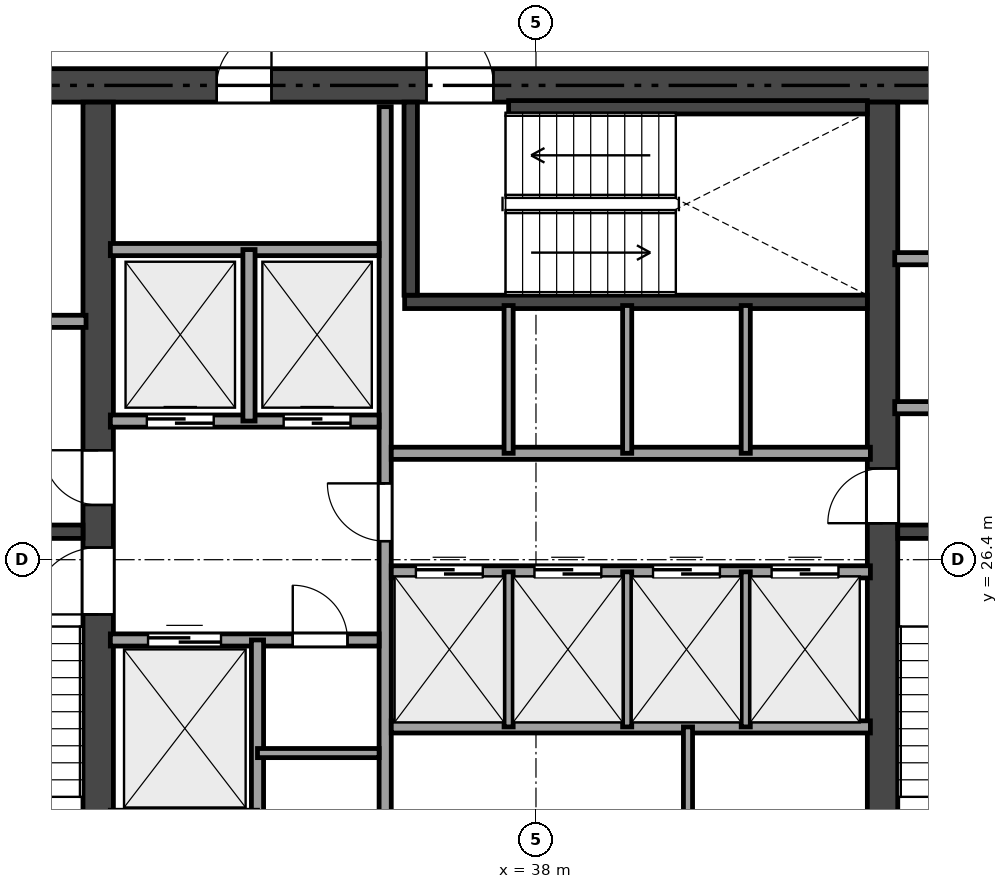
"""IFC4 building model, lengths in metres.
Left out: names, types, materials, properties, quantities, classifications, styles, units other than length and angle.
Written with IfcOpenShell. Run it as: python <this file> out.ifc"""

import sys

from ifc_helpers import new_model, si_unit, direction, frame, frame_2d, origin, place, context, subcontext, project, spatial, rectangle, extrude, element, fill, save


model = new_model("IFC4")
c1 = context("Model", 3, precision=1e-05, world=origin(), true_north=direction((0.0, 1.0)))
c2 = subcontext(c1, "Body", "Model", "MODEL_VIEW")
j1 = project(units=[si_unit("LENGTHUNIT", "METRE"), si_unit("PLANEANGLEUNIT", "RADIAN")], contexts=[c1])
p1 = place(None, origin())
s1 = spatial("IfcSite", under=j1, at=p1, CompositionType="ELEMENT")
p2 = place(p1, origin())
s2 = spatial("IfcBuilding", under=s1, at=p2, CompositionType="ELEMENT")
p3 = place(p2, frame((0.0, 0.0, 220.2)))
s3 = spatial("IfcBuildingStorey", under=s2, at=p3, CompositionType="ELEMENT", Elevation=220.2)
p4 = place(p3, frame((26.525, 34.2, 0.0), z_axis=(0.0, 0.0, 1.0), x_axis=(1.0, 0.0, 0.0)))
e1 = element("IfcWall", 1, at=p4, inside=s3, PredefinedType="SHEAR", context=c2, shape_type="SweptSolid", body=[
    extrude(rectangle(XDim=21.35, YDim=0.55, at=frame_2d((10.675, 0.0))), origin(), (0.0, 0.0, 1.0), 3.24),
])
p5 = place(p4, frame((9.675, 0.0, 0.0)))
e2 = element("IfcOpeningElement", 2, at=p5, cuts=e1, PredefinedType="OPENING", context=c2, shape_type="SweptSolid", body=[
    extrude(rectangle(XDim=1.1, YDim=2.15, at=frame_2d((0.55, 1.075))), frame((0.0, 0.285, 0.0), z_axis=(0.0, -1.0, 0.0), x_axis=(1.0, 0.0, 0.0)), (0.0, 0.0, 1.0), 0.57),
])
p6 = place(p4, frame((1.925, 0.0, 0.0)))
e3 = element("IfcOpeningElement", 3, at=p6, cuts=e1, PredefinedType="OPENING", context=c2, shape_type="SweptSolid", body=[
    extrude(rectangle(XDim=0.9, YDim=2.1, at=frame_2d((0.45, 1.05))), frame((0.0, 0.285, 0.0), z_axis=(0.0, -1.0, 0.0), x_axis=(1.0, 0.0, 0.0)), (0.0, 0.0, 1.0), 0.57),
])
p7 = place(p4, frame((6.225, 0.0, 0.0)))
e4 = element("IfcOpeningElement", 4, at=p7, cuts=e1, PredefinedType="OPENING", context=c2, shape_type="SweptSolid", body=[
    extrude(rectangle(XDim=0.9, YDim=2.1, at=frame_2d((0.45, 1.05))), frame((0.0, 0.285, 0.0), z_axis=(0.0, -1.0, 0.0), x_axis=(1.0, 0.0, 0.0)), (0.0, 0.0, 1.0), 0.57),
])
p8 = place(p3, frame((30.8, 18.875, 0.0), z_axis=(0.0, 0.0, 1.0), x_axis=(0.0, 1.0, 0.0)))
e5 = element("IfcWall", 5, at=p8, inside=s3, PredefinedType="SHEAR", context=c2, shape_type="SweptSolid", body=[
    extrude(rectangle(XDim=15.05, YDim=0.5, at=frame_2d((7.525, 0.0))), origin(), (0.0, 0.0, 1.0), 3.24),
])
p9 = place(p8, frame((6.625, 0.0, 0.0)))
e6 = element("IfcOpeningElement", 6, at=p9, cuts=e5, PredefinedType="OPENING", context=c2, shape_type="SweptSolid", body=[
    extrude(rectangle(XDim=1.1, YDim=2.15, at=frame_2d((0.55, 1.075))), frame((0.0, 0.26, 0.0), z_axis=(0.0, -1.0, 0.0), x_axis=(1.0, 0.0, 0.0)), (0.0, 0.0, 1.0), 0.52),
])
p10 = place(p8, frame((8.425, 0.0, 0.0)))
e7 = element("IfcOpeningElement", 7, at=p10, cuts=e5, PredefinedType="OPENING", context=c2, shape_type="SweptSolid", body=[
    extrude(rectangle(XDim=0.9, YDim=2.1, at=frame_2d((0.45, 1.05))), frame((0.0, 0.26, 0.0), z_axis=(0.0, -1.0, 0.0), x_axis=(1.0, 0.0, 0.0)), (0.0, 0.0, 1.0), 0.52),
])
p11 = place(p3, frame((43.7, 18.875, 0.0), z_axis=(0.0, 0.0, 1.0), x_axis=(0.0, 1.0, 0.0)))
e8 = element("IfcWall", 8, at=p11, inside=s3, PredefinedType="SHEAR", context=c2, shape_type="SweptSolid", body=[
    extrude(rectangle(XDim=15.05, YDim=0.5, at=frame_2d((7.525, 0.0))), origin(), (0.0, 0.0, 1.0), 3.24),
])
p12 = place(p11, frame((8.125, 0.0, 0.0)))
e9 = element("IfcOpeningElement", 9, at=p12, cuts=e8, PredefinedType="OPENING", context=c2, shape_type="SweptSolid", body=[
    extrude(rectangle(XDim=0.9, YDim=2.1, at=frame_2d((0.45, 1.05))), frame((0.0, 0.26, 0.0), z_axis=(0.0, -1.0, 0.0), x_axis=(1.0, 0.0, 0.0)), (0.0, 0.0, 1.0), 0.52),
])
p13 = place(p3, frame((27.075, 26.86, 0.0), z_axis=(0.0, 0.0, 1.0), x_axis=(1.0, 0.0, 0.0)))
e10 = element("IfcWall", 10, at=p13, inside=s3, PredefinedType="SHEAR", context=c2, shape_type="SweptSolid", body=[
    extrude(rectangle(XDim=3.475, YDim=0.22, at=frame_2d((1.738, 0.0))), origin(), (0.0, 0.0, 1.0), 3.24),
])
p14 = place(p3, frame((43.95, 26.86, 0.0), z_axis=(0.0, 0.0, 1.0), x_axis=(1.0, 0.0, 0.0)))
e11 = element("IfcWall", 11, at=p14, inside=s3, PredefinedType="SHEAR", context=c2, shape_type="SweptSolid", body=[
    extrude(rectangle(XDim=3.375, YDim=0.22, at=frame_2d((1.688, 0.0))), origin(), (0.0, 0.0, 1.0), 3.24),
])
p15 = place(p3, frame((35.84, 30.64, 0.0), z_axis=(0.0, 0.0, 1.0), x_axis=(1.0, 0.0, 0.0)))
e12 = element("IfcWall", 12, at=p15, inside=s3, PredefinedType="SHEAR", context=c2, shape_type="SweptSolid", body=[
    extrude(rectangle(XDim=7.61, YDim=0.22, at=frame_2d((3.805, 0.0))), origin(), (0.0, 0.0, 1.0), 3.24),
])
p16 = place(p3, frame((35.94, 30.75, 0.0), z_axis=(0.0, 0.0, 1.0), x_axis=(0.0, 1.0, 0.0)))
e13 = element("IfcWall", 13, at=p16, inside=s3, PredefinedType="SHEAR", context=c2, shape_type="SweptSolid", body=[
    extrude(rectangle(XDim=3.175, YDim=0.22, at=frame_2d((1.587, 0.0))), origin(), (0.0, 0.0, 1.0), 3.24),
])
p17 = place(p3, frame((37.55, 33.84, 0.0), z_axis=(0.0, 0.0, 1.0), x_axis=(1.0, 0.0, 0.0)))
e14 = element("IfcWall", 14, at=p17, inside=s3, PredefinedType="SHEAR", context=c2, shape_type="SweptSolid", body=[
    extrude(rectangle(XDim=5.9, YDim=0.22, at=frame_2d((2.95, 0.0))), origin(), (0.0, 0.0, 1.0), 3.24),
])
p18 = place(p3, frame((27.15, 30.32, 0.0), z_axis=(0.0, 0.0, 1.0), x_axis=(1.0, 0.0, 0.0)))
e15 = element("IfcWall", 15, at=p18, inside=s3, PredefinedType="SOLIDWALL", context=c2, shape_type="SweptSolid", body=[
    extrude(rectangle(XDim=3.45, YDim=0.2, at=frame_2d((1.725, 0.0))), origin(), (0.0, 0.0, 1.0), 3.24),
])
p19 = place(p3, frame((43.9, 28.9, 0.0), z_axis=(0.0, 0.0, 1.0), x_axis=(1.0, 0.0, 0.0)))
e16 = element("IfcWall", 16, at=p19, inside=s3, PredefinedType="SOLIDWALL", context=c2, shape_type="SweptSolid", body=[
    extrude(rectangle(XDim=3.35, YDim=0.2, at=frame_2d((1.675, 0.0))), origin(), (0.0, 0.0, 1.0), 3.24),
])
p20 = place(p19, frame((1.15, 0.0, 0.0)))
e17 = element("IfcOpeningElement", 17, at=p20, cuts=e16, PredefinedType="OPENING", context=c2, shape_type="SweptSolid", body=[
    extrude(rectangle(XDim=0.9, YDim=2.1, at=frame_2d((0.45, 1.05))), frame((0.0, 0.11, 0.0), z_axis=(0.0, -1.0, 0.0), x_axis=(1.0, 0.0, 0.0)), (0.0, 0.0, 1.0), 0.22),
])
p21 = place(p3, frame((43.9, 31.35, 0.0), z_axis=(0.0, 0.0, 1.0), x_axis=(1.0, 0.0, 0.0)))
e18 = element("IfcWall", 18, at=p21, inside=s3, PredefinedType="SOLIDWALL", context=c2, shape_type="SweptSolid", body=[
    extrude(rectangle(XDim=3.35, YDim=0.2, at=frame_2d((1.675, 0.0))), origin(), (0.0, 0.0, 1.0), 3.24),
])
p22 = place(p3, frame((35.52, 18.95, 0.0), z_axis=(0.0, 0.0, 1.0), x_axis=(0.0, 1.0, 0.0)))
e19 = element("IfcWall", 19, at=p22, inside=s3, PredefinedType="SOLIDWALL", context=c2, shape_type="SweptSolid", body=[
    extrude(rectangle(XDim=14.9, YDim=0.2, at=frame_2d((7.45, 0.0))), origin(), (0.0, 0.0, 1.0), 2.761),
])
p23 = place(p22, frame((7.755, 0.0, 0.0)))
e20 = element("IfcOpeningElement", 20, at=p23, cuts=e19, PredefinedType="OPENING", context=c2, shape_type="SweptSolid", body=[
    extrude(rectangle(XDim=0.95, YDim=2.15, at=frame_2d((0.475, 1.075))), frame((0.0, 0.11, 0.0), z_axis=(0.0, -1.0, 0.0), x_axis=(1.0, 0.0, 0.0)), (0.0, 0.0, 1.0), 0.22),
])
p24 = place(p22, frame((0.6, 0.0, 0.0)))
e21 = element("IfcOpeningElement", 21, at=p24, cuts=e19, PredefinedType="OPENING", context=c2, shape_type="SweptSolid", body=[
    extrude(rectangle(XDim=0.9, YDim=2.1, at=frame_2d((0.45, 1.05))), frame((0.0, 0.11, 0.0), z_axis=(0.0, -1.0, 0.0), x_axis=(1.0, 0.0, 0.0)), (0.0, 0.0, 1.0), 0.22),
])
p25 = place(p3, frame((31.0, 28.68, 0.0), z_axis=(0.0, 0.0, 1.0), x_axis=(1.0, 0.0, 0.0)))
e22 = element("IfcWall", 22, at=p25, inside=s3, PredefinedType="SOLIDWALL", context=c2, shape_type="SweptSolid", body=[
    extrude(rectangle(XDim=4.42, YDim=0.2, at=frame_2d((2.21, 0.0))), origin(), (0.0, 0.0, 1.0), 3.24),
])
p26 = place(p25, frame((0.6, 0.0, 0.0)))
e23 = element("IfcOpeningElement", 23, at=p26, cuts=e22, PredefinedType="OPENING", context=c2, shape_type="SweptSolid", body=[
    extrude(rectangle(XDim=1.1, YDim=2.15, at=frame_2d((0.55, 1.075))), frame((0.0, 0.11, 0.0), z_axis=(0.0, -1.0, 0.0), x_axis=(1.0, 0.0, 0.0)), (0.0, 0.0, 1.0), 0.22),
])
p27 = place(p25, frame((2.85, 0.0, 0.0)))
e24 = element("IfcOpeningElement", 24, at=p27, cuts=e22, PredefinedType="OPENING", context=c2, shape_type="SweptSolid", body=[
    extrude(rectangle(XDim=1.1, YDim=2.15, at=frame_2d((0.55, 1.075))), frame((0.0, 0.11, 0.0), z_axis=(0.0, -1.0, 0.0), x_axis=(1.0, 0.0, 0.0)), (0.0, 0.0, 1.0), 0.22),
])
p28 = place(p3, frame((31.0, 31.5, 0.0), z_axis=(0.0, 0.0, 1.0), x_axis=(1.0, 0.0, 0.0)))
e25 = element("IfcWall", 25, at=p28, inside=s3, PredefinedType="SOLIDWALL", context=c2, shape_type="SweptSolid", body=[
    extrude(rectangle(XDim=4.42, YDim=0.2, at=frame_2d((2.21, 0.0))), origin(), (0.0, 0.0, 1.0), 3.24),
])
p29 = place(p3, frame((33.28, 28.68, 0.0), z_axis=(0.0, 0.0, 1.0), x_axis=(0.0, 1.0, 0.0)))
e26 = element("IfcWall", 26, at=p29, inside=s3, PredefinedType="SOLIDWALL", context=c2, shape_type="SweptSolid", body=[
    extrude(rectangle(XDim=2.82, YDim=0.2, at=frame_2d((1.41, 0.0))), origin(), (0.0, 0.0, 1.0), 3.24),
])
p30 = place(p3, frame((31.0, 25.08, 0.0), z_axis=(0.0, 0.0, 1.0), x_axis=(1.0, 0.0, 0.0)))
e27 = element("IfcWall", 27, at=p30, inside=s3, PredefinedType="SOLIDWALL", context=c2, shape_type="SweptSolid", body=[
    extrude(rectangle(XDim=4.42, YDim=0.2, at=frame_2d((2.21, 0.0))), origin(), (0.0, 0.0, 1.0), 3.24),
])
p31 = place(p30, frame((3.0, 0.0, 0.0)))
e28 = element("IfcOpeningElement", 28, at=p31, cuts=e27, PredefinedType="OPENING", context=c2, shape_type="SweptSolid", body=[
    extrude(rectangle(XDim=0.9, YDim=2.1, at=frame_2d((0.45, 1.05))), frame((0.0, 0.11, 0.0), z_axis=(0.0, -1.0, 0.0), x_axis=(1.0, 0.0, 0.0)), (0.0, 0.0, 1.0), 0.22),
])
p32 = place(p30, frame((0.62, 0.0, 0.0)))
e29 = element("IfcOpeningElement", 29, at=p32, cuts=e27, PredefinedType="OPENING", context=c2, shape_type="SweptSolid", body=[
    extrude(rectangle(XDim=1.2, YDim=2.15, at=frame_2d((0.6, 1.075))), frame((0.0, 0.11, 0.0), z_axis=(0.0, -1.0, 0.0), x_axis=(1.0, 0.0, 0.0)), (0.0, 0.0, 1.0), 0.22),
])
p33 = place(p3, frame((33.42, 18.95, 0.0), z_axis=(0.0, 0.0, 1.0), x_axis=(0.0, 1.0, 0.0)))
e30 = element("IfcWall", 30, at=p33, inside=s3, PredefinedType="SOLIDWALL", context=c2, shape_type="SweptSolid", body=[
    extrude(rectangle(XDim=6.13, YDim=0.2, at=frame_2d((3.065, 0.0))), origin(), (0.0, 0.0, 1.0), 2.761),
])
p34 = place(p3, frame((33.42, 23.22, 0.0), z_axis=(0.0, 0.0, 1.0), x_axis=(1.0, 0.0, 0.0)))
e31 = element("IfcWall", 31, at=p34, inside=s3, PredefinedType="PARTITIONING", context=c2, shape_type="SweptSolid", body=[
    extrude(rectangle(XDim=2.0, YDim=0.15, at=frame_2d((1.0, 0.0))), origin(), (0.0, 0.0, 1.0), 3.24),
])
p35 = place(p3, frame((35.62, 28.15, 0.0), z_axis=(0.0, 0.0, 1.0), x_axis=(1.0, 0.0, 0.0)))
e32 = element("IfcWall", 32, at=p35, inside=s3, PredefinedType="SOLIDWALL", context=c2, shape_type="SweptSolid", body=[
    extrude(rectangle(XDim=7.88, YDim=0.2, at=frame_2d((3.94, 0.0))), origin(), (0.0, 0.0, 1.0), 3.24),
])
p36 = place(p3, frame((35.62, 26.2, 0.0), z_axis=(0.0, 0.0, 1.0), x_axis=(1.0, 0.0, 0.0)))
e33 = element("IfcWall", 33, at=p36, inside=s3, PredefinedType="SOLIDWALL", context=c2, shape_type="SweptSolid", body=[
    extrude(rectangle(XDim=7.88, YDim=0.2, at=frame_2d((3.94, 0.0))), origin(), (0.0, 0.0, 1.0), 3.24),
])
p37 = place(p36, frame((0.405, 0.0, 0.0)))
e34 = element("IfcOpeningElement", 34, at=p37, cuts=e33, PredefinedType="OPENING", context=c2, shape_type="SweptSolid", body=[
    extrude(rectangle(XDim=1.1, YDim=2.15, at=frame_2d((0.55, 1.075))), frame((0.0, 0.11, 0.0), z_axis=(0.0, -1.0, 0.0), x_axis=(1.0, 0.0, 0.0)), (0.0, 0.0, 1.0), 0.22),
])
p38 = place(p36, frame((2.355, 0.0, 0.0)))
e35 = element("IfcOpeningElement", 35, at=p38, cuts=e33, PredefinedType="OPENING", context=c2, shape_type="SweptSolid", body=[
    extrude(rectangle(XDim=1.1, YDim=2.15, at=frame_2d((0.55, 1.075))), frame((0.0, 0.11, 0.0), z_axis=(0.0, -1.0, 0.0), x_axis=(1.0, 0.0, 0.0)), (0.0, 0.0, 1.0), 0.22),
])
p39 = place(p36, frame((4.305, 0.0, 0.0)))
e36 = element("IfcOpeningElement", 36, at=p39, cuts=e33, PredefinedType="OPENING", context=c2, shape_type="SweptSolid", body=[
    extrude(rectangle(XDim=1.1, YDim=2.15, at=frame_2d((0.55, 1.075))), frame((0.0, 0.11, 0.0), z_axis=(0.0, -1.0, 0.0), x_axis=(1.0, 0.0, 0.0)), (0.0, 0.0, 1.0), 0.22),
])
p40 = place(p36, frame((6.255, 0.0, 0.0)))
e37 = element("IfcOpeningElement", 37, at=p40, cuts=e33, PredefinedType="OPENING", context=c2, shape_type="SweptSolid", body=[
    extrude(rectangle(XDim=1.1, YDim=2.15, at=frame_2d((0.55, 1.075))), frame((0.0, 0.11, 0.0), z_axis=(0.0, -1.0, 0.0), x_axis=(1.0, 0.0, 0.0)), (0.0, 0.0, 1.0), 0.22),
])
p41 = place(p3, frame((35.62, 23.65, 0.0), z_axis=(0.0, 0.0, 1.0), x_axis=(1.0, 0.0, 0.0)))
e38 = element("IfcWall", 38, at=p41, inside=s3, PredefinedType="SOLIDWALL", context=c2, shape_type="SweptSolid", body=[
    extrude(rectangle(XDim=7.88, YDim=0.2, at=frame_2d((3.94, 0.0))), origin(), (0.0, 0.0, 1.0), 2.761),
])
for number, where, z_axis, x_axis in (
    (39, (37.55, 28.15, 0.0), (0.0, 0.0, 1.0), (0.0, 1.0, 0.0)),
    (40, (39.5, 28.15, 0.0), (0.0, 0.0, 1.0), (0.0, 1.0, 0.0)),
    (41, (41.45, 28.15, 0.0), (0.0, 0.0, 1.0), (0.0, 1.0, 0.0)),
):
    element("IfcWall", number, at=place(p3, frame(where, z_axis=z_axis, x_axis=x_axis)), inside=s3, PredefinedType="PARTITIONING", context=c2, shape_type="SweptSolid", body=[
        extrude(rectangle(XDim=2.43, YDim=0.15, at=frame_2d((1.215, 0.0))), origin(), (0.0, 0.0, 1.0), 3.24),
    ])
for number, where, z_axis, x_axis in (
    (42, (37.55, 23.65, 0.0), (0.0, 0.0, 1.0), (0.0, 1.0, 0.0)),
    (43, (39.5, 23.65, 0.0), (0.0, 0.0, 1.0), (0.0, 1.0, 0.0)),
    (44, (41.45, 23.65, 0.0), (0.0, 0.0, 1.0), (0.0, 1.0, 0.0)),
):
    element("IfcWall", number, at=place(p3, frame(where, z_axis=z_axis, x_axis=x_axis)), inside=s3, PredefinedType="PARTITIONING", context=c2, shape_type="SweptSolid", body=[
        extrude(rectangle(XDim=2.55, YDim=0.15, at=frame_2d((1.275, 0.0))), origin(), (0.0, 0.0, 1.0), 2.761),
    ])
p42 = place(p3, frame((40.5, 21.25, 0.0), z_axis=(0.0, 0.0, 1.0), x_axis=(0.0, 1.0, 0.0)))
e45 = element("IfcWall", 45, at=p42, inside=s3, PredefinedType="PARTITIONING", context=c2, shape_type="SweptSolid", body=[
    extrude(rectangle(XDim=2.4, YDim=0.15, at=frame_2d((1.2, 0.0))), origin(), (0.0, 0.0, 1.0), 2.761),
])
p43 = place(p9, origin())
e46 = element("IfcDoor", 46, at=p43, inside=s3, OperationType="SINGLE_SWING_LEFT", PredefinedType="DOOR", context=c2, shape_type="SweptSolid", body=[
    extrude(rectangle(XDim=1.1, YDim=2.15, at=frame_2d((0.55, 1.075))), frame((0.0, 0.025, 0.0), z_axis=(0.0, -1.0, 0.0), x_axis=(1.0, 0.0, 0.0)), (0.0, 0.0, 1.0), 0.05),
])
fill(e6, e46)
p44 = place(p5, origin())
e47 = element("IfcDoor", 47, at=p44, inside=s3, OperationType="SINGLE_SWING_LEFT", PredefinedType="DOOR", context=c2, shape_type="SweptSolid", body=[
    extrude(rectangle(XDim=1.1, YDim=2.15, at=frame_2d((0.55, 1.075))), frame((0.0, 0.025, 0.0), z_axis=(0.0, -1.0, 0.0), x_axis=(1.0, 0.0, 0.0)), (0.0, 0.0, 1.0), 0.05),
])
fill(e2, e47)
p45 = place(p23, origin())
e48 = element("IfcDoor", 48, at=p45, inside=s3, OperationType="SINGLE_SWING_RIGHT", PredefinedType="DOOR", context=c2, shape_type="SweptSolid", body=[
    extrude(rectangle(XDim=0.95, YDim=2.15, at=frame_2d((0.475, 1.075))), frame((0.0, 0.025, 0.0), z_axis=(0.0, -1.0, 0.0), x_axis=(1.0, 0.0, 0.0)), (0.0, 0.0, 1.0), 0.05),
])
fill(e20, e48)
p46 = place(p12, origin())
e49 = element("IfcDoor", 49, at=p46, inside=s3, OperationType="SINGLE_SWING_LEFT", PredefinedType="DOOR", context=c2, shape_type="SweptSolid", body=[
    extrude(rectangle(XDim=0.9, YDim=2.1, at=frame_2d((0.45, 1.05))), frame((0.0, 0.025, 0.0), z_axis=(0.0, -1.0, 0.0), x_axis=(1.0, 0.0, 0.0)), (0.0, 0.0, 1.0), 0.05),
])
fill(e9, e49)
p47 = place(p10, origin())
e50 = element("IfcDoor", 50, at=p47, inside=s3, OperationType="SINGLE_SWING_RIGHT", PredefinedType="DOOR", context=c2, shape_type="SweptSolid", body=[
    extrude(rectangle(XDim=0.9, YDim=2.1, at=frame_2d((0.45, 1.05))), frame((0.0, 0.025, 0.0), z_axis=(0.0, -1.0, 0.0), x_axis=(1.0, 0.0, 0.0)), (0.0, 0.0, 1.0), 0.05),
])
fill(e7, e50)
p48 = place(p7, origin())
e51 = element("IfcDoor", 51, at=p48, inside=s3, OperationType="SINGLE_SWING_RIGHT", PredefinedType="DOOR", context=c2, shape_type="SweptSolid", body=[
    extrude(rectangle(XDim=0.9, YDim=2.1, at=frame_2d((0.45, 1.05))), frame((0.0, 0.025, 0.0), z_axis=(0.0, -1.0, 0.0), x_axis=(1.0, 0.0, 0.0)), (0.0, 0.0, 1.0), 0.05),
])
fill(e4, e51)
p49 = place(p31, origin())
e52 = element("IfcDoor", 52, at=p49, inside=s3, OperationType="SINGLE_SWING_LEFT", PredefinedType="DOOR", context=c2, shape_type="SweptSolid", body=[
    extrude(rectangle(XDim=0.9, YDim=2.1, at=frame_2d((0.45, 1.05))), frame((0.0, 0.025, 0.0), z_axis=(0.0, -1.0, 0.0), x_axis=(1.0, 0.0, 0.0)), (0.0, 0.0, 1.0), 0.05),
])
fill(e28, e52)
p50 = place(p26, origin())
e53 = element("IfcDoor", 53, at=p50, inside=s3, OperationType="SLIDING_TO_LEFT", PredefinedType="DOOR", context=c2, shape_type="SweptSolid", body=[
    extrude(rectangle(XDim=1.1, YDim=2.15, at=frame_2d((0.55, 1.075))), frame((0.0, 0.025, 0.0), z_axis=(0.0, -1.0, 0.0), x_axis=(1.0, 0.0, 0.0)), (0.0, 0.0, 1.0), 0.05),
])
fill(e23, e53)
p51 = place(p27, origin())
e54 = element("IfcDoor", 54, at=p51, inside=s3, OperationType="SLIDING_TO_LEFT", PredefinedType="DOOR", context=c2, shape_type="SweptSolid", body=[
    extrude(rectangle(XDim=1.1, YDim=2.15, at=frame_2d((0.55, 1.075))), frame((0.0, 0.025, 0.0), z_axis=(0.0, -1.0, 0.0), x_axis=(1.0, 0.0, 0.0)), (0.0, 0.0, 1.0), 0.05),
])
fill(e24, e54)
p52 = place(p32, origin())
e55 = element("IfcDoor", 55, at=p52, inside=s3, OperationType="SLIDING_TO_LEFT", PredefinedType="DOOR", context=c2, shape_type="SweptSolid", body=[
    extrude(rectangle(XDim=1.2, YDim=2.15, at=frame_2d((0.6, 1.075))), frame((0.0, 0.025, 0.0), z_axis=(0.0, -1.0, 0.0), x_axis=(1.0, 0.0, 0.0)), (0.0, 0.0, 1.0), 0.05),
])
fill(e29, e55)
p53 = place(p37, origin())
e56 = element("IfcDoor", 56, at=p53, inside=s3, OperationType="SLIDING_TO_LEFT", PredefinedType="DOOR", context=c2, shape_type="SweptSolid", body=[
    extrude(rectangle(XDim=1.1, YDim=2.15, at=frame_2d((0.55, 1.075))), frame((0.0, 0.025, 0.0), z_axis=(0.0, -1.0, 0.0), x_axis=(1.0, 0.0, 0.0)), (0.0, 0.0, 1.0), 0.05),
])
fill(e34, e56)
p54 = place(p38, origin())
e57 = element("IfcDoor", 57, at=p54, inside=s3, OperationType="SLIDING_TO_LEFT", PredefinedType="DOOR", context=c2, shape_type="SweptSolid", body=[
    extrude(rectangle(XDim=1.1, YDim=2.15, at=frame_2d((0.55, 1.075))), frame((0.0, 0.025, 0.0), z_axis=(0.0, -1.0, 0.0), x_axis=(1.0, 0.0, 0.0)), (0.0, 0.0, 1.0), 0.05),
])
fill(e35, e57)
p55 = place(p39, origin())
e58 = element("IfcDoor", 58, at=p55, inside=s3, OperationType="SLIDING_TO_LEFT", PredefinedType="DOOR", context=c2, shape_type="SweptSolid", body=[
    extrude(rectangle(XDim=1.1, YDim=2.15, at=frame_2d((0.55, 1.075))), frame((0.0, 0.025, 0.0), z_axis=(0.0, -1.0, 0.0), x_axis=(1.0, 0.0, 0.0)), (0.0, 0.0, 1.0), 0.05),
])
fill(e36, e58)
p56 = place(p40, origin())
e59 = element("IfcDoor", 59, at=p56, inside=s3, OperationType="SLIDING_TO_LEFT", PredefinedType="DOOR", context=c2, shape_type="SweptSolid", body=[
    extrude(rectangle(XDim=1.1, YDim=2.15, at=frame_2d((0.55, 1.075))), frame((0.0, 0.025, 0.0), z_axis=(0.0, -1.0, 0.0), x_axis=(1.0, 0.0, 0.0)), (0.0, 0.0, 1.0), 0.05),
])
fill(e37, e59)
save(model, sys.argv[1])
